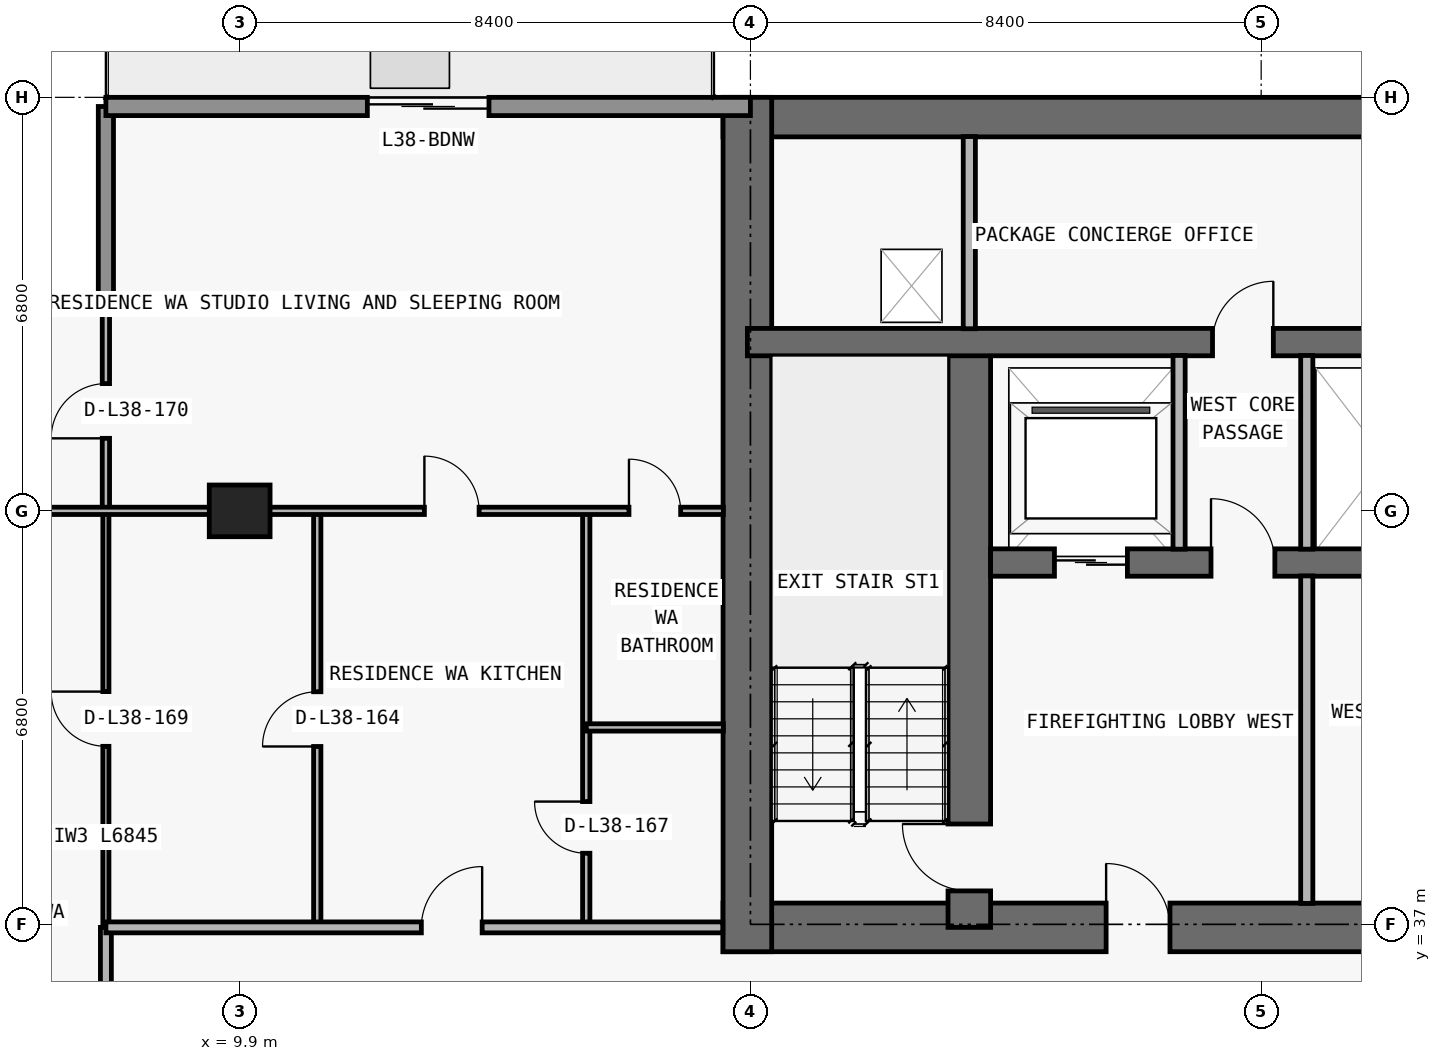
"""IFC4 building model, lengths in metres.
Left out: names, types, materials, properties, quantities, classifications, styles, units other than length and angle.
Written with IfcOpenShell. Run it as: python <this file> out.ifc"""

import sys

from ifc_helpers import new_model, si_unit, direction, frame, frame_2d, origin, origin_2d, place, context, subcontext, project, spatial, rectangle, extrude, element, fill, save


model = new_model("IFC4")
c1 = context("Model", 3, precision=1e-05, world=origin(), true_north=direction((0.0, 1.0)))
c2 = subcontext(c1, "Body", "Model", "MODEL_VIEW")
j1 = project(units=[si_unit("LENGTHUNIT", "METRE"), si_unit("PLANEANGLEUNIT", "RADIAN")], contexts=[c1])
p1 = place(None, origin())
s1 = spatial("IfcSite", under=j1, at=p1, CompositionType="ELEMENT")
p2 = place(p1, origin())
s2 = spatial("IfcBuilding", under=s1, at=p2, CompositionType="ELEMENT")
p3 = place(p2, frame((0.0, 0.0, 138.9)))
s3 = spatial("IfcBuildingStorey", under=s2, at=p3, CompositionType="ELEMENT", Elevation=138.9)
p4 = place(p3, frame((9.9, 43.8, 0.0), z_axis=(0.0, 0.0, 1.0), x_axis=(1.0, 0.0, 0.0)))
e1 = element("IfcColumn", 1, at=p4, inside=s3, PredefinedType="COLUMN", context=c2, shape_type="SweptSolid", body=[
    extrude(rectangle(XDim=1.0, YDim=0.85, at=origin_2d()), origin(), (0.0, 0.0, 1.0), 3.05),
])
p5 = place(p3, frame((17.85, 36.95, 0.0), z_axis=(0.0, 0.0, 1.0), x_axis=(1.0, 0.0, 0.0)))
e2 = element("IfcWall", 2, at=p5, inside=s3, PredefinedType="SHEAR", context=c2, shape_type="SweptSolid", body=[
    extrude(rectangle(XDim=42.1, YDim=0.8, at=frame_2d((21.05, 0.0))), origin(), (0.0, 0.0, 1.0), 3.05),
])
p6 = place(p5, frame((14.45, 0.0, 0.0)))
e3 = element("IfcOpeningElement", 3, at=p6, cuts=e2, PredefinedType="OPENING", context=c2, shape_type="SweptSolid", body=[
    extrude(rectangle(XDim=1.1, YDim=2.15, at=frame_2d((0.55, 1.075))), frame((0.0, 0.41, 0.0), z_axis=(0.0, -1.0, 0.0), x_axis=(1.0, 0.0, 0.0)), (0.0, 0.0, 1.0), 0.82),
])
p7 = place(p5, frame((6.3, 0.0, 0.0)))
e4 = element("IfcOpeningElement", 4, at=p7, cuts=e2, PredefinedType="OPENING", context=c2, shape_type="SweptSolid", body=[
    extrude(rectangle(XDim=1.05, YDim=2.15, at=frame_2d((0.525, 1.075))), frame((0.0, 0.41, 0.0), z_axis=(0.0, -1.0, 0.0), x_axis=(1.0, 0.0, 0.0)), (0.0, 0.0, 1.0), 0.82),
])
p8 = place(p5, frame((34.8, 0.0, 0.0)))
e5 = element("IfcOpeningElement", 5, at=p8, cuts=e2, PredefinedType="OPENING", context=c2, shape_type="SweptSolid", body=[
    extrude(rectangle(XDim=1.05, YDim=2.15, at=frame_2d((0.525, 1.075))), frame((0.0, 0.41, 0.0), z_axis=(0.0, -1.0, 0.0), x_axis=(1.0, 0.0, 0.0)), (0.0, 0.0, 1.0), 0.82),
])
p9 = place(p5, frame((10.913, 0.0, 0.0)))
e6 = element("IfcOpeningElement", 6, at=p9, cuts=e2, PredefinedType="OPENING", context=c2, shape_type="SweptSolid", body=[
    extrude(rectangle(XDim=1.05, YDim=2.15, at=frame_2d((0.525, 1.075))), frame((0.0, 0.41, 0.0), z_axis=(0.0, -1.0, 0.0), x_axis=(1.0, 0.0, 0.0)), (0.0, 0.0, 1.0), 0.82),
])
p10 = place(p5, frame((24.15, 0.0, 0.0)))
e7 = element("IfcOpeningElement", 7, at=p10, cuts=e2, PredefinedType="OPENING", context=c2, shape_type="SweptSolid", body=[
    extrude(rectangle(XDim=1.05, YDim=2.15, at=frame_2d((0.525, 1.075))), frame((0.0, 0.41, 0.0), z_axis=(0.0, -1.0, 0.0), x_axis=(1.0, 0.0, 0.0)), (0.0, 0.0, 1.0), 0.82),
])
p11 = place(p3, frame((17.85, 50.275, 0.0), z_axis=(0.0, 0.0, 1.0), x_axis=(1.0, 0.0, 0.0)))
e8 = element("IfcWall", 8, at=p11, inside=s3, PredefinedType="SHEAR", context=c2, shape_type="SweptSolid", body=[
    extrude(rectangle(XDim=42.1, YDim=0.65, at=frame_2d((21.05, 0.0))), origin(), (0.0, 0.0, 1.0), 3.05),
])
p12 = place(p3, frame((18.25, 36.55, 0.0), z_axis=(0.0, 0.0, 1.0), x_axis=(0.0, 1.0, 0.0)))
e9 = element("IfcWall", 9, at=p12, inside=s3, PredefinedType="SHEAR", context=c2, shape_type="SweptSolid", body=[
    extrude(rectangle(XDim=14.05, YDim=0.8, at=frame_2d((7.025, 0.0))), origin(), (0.0, 0.0, 1.0), 3.05),
])
p13 = place(p3, frame((21.9, 36.95, 0.0), z_axis=(0.0, 0.0, 1.0), x_axis=(0.0, 1.0, 0.0)))
e10 = element("IfcWall", 10, at=p13, inside=s3, PredefinedType="SHEAR", context=c2, shape_type="SweptSolid", body=[
    extrude(rectangle(XDim=9.625, YDim=0.7, at=frame_2d((4.812, 0.0))), origin(), (0.0, 0.0, 1.0), 3.05),
])
p14 = place(p13, frame((0.6, 0.0, 0.0)))
e11 = element("IfcOpeningElement", 11, at=p14, cuts=e10, PredefinedType="OPENING", context=c2, shape_type="SweptSolid", body=[
    extrude(rectangle(XDim=1.1, YDim=2.15, at=frame_2d((0.55, 1.075))), frame((0.0, 0.36, 0.0), z_axis=(0.0, -1.0, 0.0), x_axis=(1.0, 0.0, 0.0)), (0.0, 0.0, 1.0), 0.72),
])
p15 = place(p3, frame((22.25, 42.95, 0.0), z_axis=(0.0, 0.0, 1.0), x_axis=(1.0, 0.0, 0.0)))
e12 = element("IfcWall", 12, at=p15, inside=s3, PredefinedType="SHEAR", context=c2, shape_type="SweptSolid", body=[
    extrude(rectangle(XDim=33.3, YDim=0.45, at=frame_2d((16.65, 0.0))), origin(), (0.0, 0.0, 1.0), 3.05),
])
p16 = place(p15, frame((1.05, 0.0, 0.0)))
e13 = element("IfcOpeningElement", 13, at=p16, cuts=e12, PredefinedType="OPENING", context=c2, shape_type="SweptSolid", body=[
    extrude(rectangle(XDim=1.2, YDim=2.2, at=frame_2d((0.6, 1.1))), frame((0.0, 0.235, 0.0), z_axis=(0.0, -1.0, 0.0), x_axis=(1.0, 0.0, 0.0)), (0.0, 0.0, 1.0), 0.47),
])
p17 = place(p15, frame((31.05, 0.0, 0.0)))
e14 = element("IfcOpeningElement", 14, at=p17, cuts=e12, PredefinedType="OPENING", context=c2, shape_type="SweptSolid", body=[
    extrude(rectangle(XDim=1.2, YDim=2.2, at=frame_2d((0.6, 1.1))), frame((0.0, 0.235, 0.0), z_axis=(0.0, -1.0, 0.0), x_axis=(1.0, 0.0, 0.0)), (0.0, 0.0, 1.0), 0.47),
])
p18 = place(p15, frame((21.4, 0.0, 0.0)))
e15 = element("IfcOpeningElement", 15, at=p18, cuts=e12, PredefinedType="OPENING", context=c2, shape_type="SweptSolid", body=[
    extrude(rectangle(XDim=1.1, YDim=2.2, at=frame_2d((0.55, 1.1))), frame((0.0, 0.235, 0.0), z_axis=(0.0, -1.0, 0.0), x_axis=(1.0, 0.0, 0.0)), (0.0, 0.0, 1.0), 0.47),
])
p19 = place(p15, frame((24.0, 0.0, 0.0)))
e16 = element("IfcOpeningElement", 16, at=p19, cuts=e12, PredefinedType="OPENING", context=c2, shape_type="SweptSolid", body=[
    extrude(rectangle(XDim=1.1, YDim=2.2, at=frame_2d((0.55, 1.1))), frame((0.0, 0.235, 0.0), z_axis=(0.0, -1.0, 0.0), x_axis=(1.0, 0.0, 0.0)), (0.0, 0.0, 1.0), 0.47),
])
p20 = place(p15, frame((3.625, 0.0, 0.0)))
e17 = element("IfcOpeningElement", 17, at=p20, cuts=e12, PredefinedType="OPENING", context=c2, shape_type="SweptSolid", body=[
    extrude(rectangle(XDim=1.05, YDim=2.15, at=frame_2d((0.525, 1.075))), frame((0.0, 0.235, 0.0), z_axis=(0.0, -1.0, 0.0), x_axis=(1.0, 0.0, 0.0)), (0.0, 0.0, 1.0), 0.47),
])
p21 = place(p15, frame((28.675, 0.0, 0.0)))
e18 = element("IfcOpeningElement", 18, at=p21, cuts=e12, PredefinedType="OPENING", context=c2, shape_type="SweptSolid", body=[
    extrude(rectangle(XDim=1.05, YDim=2.15, at=frame_2d((0.525, 1.075))), frame((0.0, 0.235, 0.0), z_axis=(0.0, -1.0, 0.0), x_axis=(1.0, 0.0, 0.0)), (0.0, 0.0, 1.0), 0.47),
])
p22 = place(p15, frame((15.975, 0.0, 0.0)))
e19 = element("IfcOpeningElement", 19, at=p22, cuts=e12, PredefinedType="OPENING", context=c2, shape_type="SweptSolid", body=[
    extrude(rectangle(XDim=1.0, YDim=2.2, at=frame_2d((0.5, 1.1))), frame((0.0, 0.235, 0.0), z_axis=(0.0, -1.0, 0.0), x_axis=(1.0, 0.0, 0.0)), (0.0, 0.0, 1.0), 0.47),
])
p23 = place(p3, frame((18.25, 46.575, 0.0), z_axis=(0.0, 0.0, 1.0), x_axis=(1.0, 0.0, 0.0)))
e20 = element("IfcWall", 20, at=p23, inside=s3, PredefinedType="SHEAR", context=c2, shape_type="SweptSolid", body=[
    extrude(rectangle(XDim=41.3, YDim=0.45, at=frame_2d((20.65, 0.0))), origin(), (0.0, 0.0, 1.0), 3.05),
])
p24 = place(p23, frame((7.65, 0.0, 0.0)))
e21 = element("IfcOpeningElement", 21, at=p24, cuts=e20, PredefinedType="OPENING", context=c2, shape_type="SweptSolid", body=[
    extrude(rectangle(XDim=1.0, YDim=2.2, at=frame_2d((0.5, 1.1))), frame((0.0, 0.235, 0.0), z_axis=(0.0, -1.0, 0.0), x_axis=(1.0, 0.0, 0.0)), (0.0, 0.0, 1.0), 0.47),
])
p25 = place(p23, frame((32.675, 0.0, 0.0)))
e22 = element("IfcOpeningElement", 22, at=p25, cuts=e20, PredefinedType="OPENING", context=c2, shape_type="SweptSolid", body=[
    extrude(rectangle(XDim=1.05, YDim=2.15, at=frame_2d((0.525, 1.075))), frame((0.0, 0.235, 0.0), z_axis=(0.0, -1.0, 0.0), x_axis=(1.0, 0.0, 0.0)), (0.0, 0.0, 1.0), 0.47),
])
p26 = place(p3, frame((4.05, 47.2, 0.0), z_axis=(0.0, 0.0, 1.0), x_axis=(1.0, 0.0, 0.0)))
e23 = element("IfcWall", 23, at=p26, inside=s3, PredefinedType="ELEMENTEDWALL", context=c2, shape_type="SweptSolid", body=[
    extrude(rectangle(XDim=3.65, YDim=0.25, at=frame_2d((1.825, 0.0))), origin(), (0.0, 0.0, 1.0), 3.05),
])
p27 = place(p3, frame((7.7, 47.2, 0.0), z_axis=(0.0, 0.0, 1.0), x_axis=(0.0, 1.0, 0.0)))
e24 = element("IfcWall", 24, at=p27, inside=s3, PredefinedType="ELEMENTEDWALL", context=c2, shape_type="SweptSolid", body=[
    extrude(rectangle(XDim=3.25, YDim=0.25, at=frame_2d((1.625, 0.0))), origin(), (0.0, 0.0, 1.0), 3.05),
])
p28 = place(p3, frame((7.7, 50.45, 0.0), z_axis=(0.0, 0.0, 1.0), x_axis=(1.0, 0.0, 0.0)))
e25 = element("IfcWall", 25, at=p28, inside=s3, PredefinedType="STANDARD", context=c2, shape_type="SweptSolid", body=[
    extrude(rectangle(XDim=10.6, YDim=0.3, at=frame_2d((5.3, 0.0))), origin(), (0.0, 0.0, 1.0), 3.05),
])
p29 = place(p28, frame((4.3, 0.0, 0.0)))
e26 = element("IfcOpeningElement", 26, at=p29, cuts=e25, PredefinedType="OPENING", context=c2, shape_type="SweptSolid", body=[
    extrude(rectangle(XDim=2.0, YDim=2.3, at=frame_2d((1.0, 1.15))), frame((0.0, 0.16, 0.0), z_axis=(0.0, -1.0, 0.0), x_axis=(1.0, 0.0, 0.0)), (0.0, 0.0, 1.0), 0.32),
])
p30 = place(p3, frame((7.7, 34.005, 0.0), z_axis=(0.0, 0.0, 1.0), x_axis=(0.0, 1.0, 0.0)))
e27 = element("IfcWall", 27, at=p30, inside=s3, PredefinedType="PARTITIONING", context=c2, shape_type="SweptSolid", body=[
    extrude(rectangle(XDim=2.945, YDim=0.18, at=frame_2d((1.473, 0.0))), origin(), (0.0, 0.0, 1.0), 3.05),
])
p31 = place(p3, frame((7.7, 36.955, 0.0), z_axis=(0.0, 0.0, 1.0), x_axis=(0.0, 1.0, 0.0)))
e28 = element("IfcWall", 28, at=p31, inside=s3, PredefinedType="MOVABLE", context=c2, shape_type="SweptSolid", body=[
    extrude(rectangle(XDim=6.845, YDim=0.1, at=frame_2d((3.422, 0.0))), origin(), (0.0, 0.0, 1.0), 3.05),
])
p32 = place(p31, frame((2.972, 0.0, 0.0)))
e29 = element("IfcOpeningElement", 29, at=p32, cuts=e28, PredefinedType="OPENING", context=c2, shape_type="SweptSolid", body=[
    extrude(rectangle(XDim=0.9, YDim=2.15, at=frame_2d((0.45, 1.075))), frame((0.0, 0.06, 0.0), z_axis=(0.0, -1.0, 0.0), x_axis=(1.0, 0.0, 0.0)), (0.0, 0.0, 1.0), 0.12),
])
p33 = place(p3, frame((7.7, 43.805, 0.0), z_axis=(0.0, 0.0, 1.0), x_axis=(0.0, 1.0, 0.0)))
e30 = element("IfcWall", 30, at=p33, inside=s3, PredefinedType="PARTITIONING", context=c2, shape_type="SweptSolid", body=[
    extrude(rectangle(XDim=3.275, YDim=0.12, at=frame_2d((1.638, 0.0))), origin(), (0.0, 0.0, 1.0), 3.05),
])
p34 = place(p33, frame((1.188, 0.0, 0.0)))
e31 = element("IfcOpeningElement", 31, at=p34, cuts=e30, PredefinedType="OPENING", context=c2, shape_type="SweptSolid", body=[
    extrude(rectangle(XDim=0.9, YDim=2.15, at=frame_2d((0.45, 1.075))), frame((0.0, 0.07, 0.0), z_axis=(0.0, -1.0, 0.0), x_axis=(1.0, 0.0, 0.0)), (0.0, 0.0, 1.0), 0.14),
])
p35 = place(p3, frame((11.176, 36.95, 0.0), z_axis=(0.0, 0.0, 1.0), x_axis=(0.0, 1.0, 0.0)))
e32 = element("IfcWall", 32, at=p35, inside=s3, PredefinedType="PARTITIONING", context=c2, shape_type="SweptSolid", body=[
    extrude(rectangle(XDim=6.85, YDim=0.12, at=frame_2d((3.425, 0.0))), origin(), (0.0, 0.0, 1.0), 3.05),
])
p36 = place(p35, frame((2.975, 0.0, 0.0)))
e33 = element("IfcOpeningElement", 33, at=p36, cuts=e32, PredefinedType="OPENING", context=c2, shape_type="SweptSolid", body=[
    extrude(rectangle(XDim=0.9, YDim=2.15, at=frame_2d((0.45, 1.075))), frame((0.0, 0.07, 0.0), z_axis=(0.0, -1.0, 0.0), x_axis=(1.0, 0.0, 0.0)), (0.0, 0.0, 1.0), 0.14),
])
p37 = place(p3, frame((15.6, 36.95, 0.0), z_axis=(0.0, 0.0, 1.0), x_axis=(0.0, 1.0, 0.0)))
e34 = element("IfcWall", 34, at=p37, inside=s3, PredefinedType="PARTITIONING", context=c2, shape_type="SweptSolid", body=[
    extrude(rectangle(XDim=6.85, YDim=0.12, at=frame_2d((3.425, 0.0))), origin(), (0.0, 0.0, 1.0), 3.05),
])
p38 = place(p37, frame((1.219, 0.0, 0.0)))
e35 = element("IfcOpeningElement", 35, at=p38, cuts=e34, PredefinedType="OPENING", context=c2, shape_type="SweptSolid", body=[
    extrude(rectangle(XDim=0.85, YDim=2.1, at=frame_2d((0.425, 1.05))), frame((0.0, 0.07, 0.0), z_axis=(0.0, -1.0, 0.0), x_axis=(1.0, 0.0, 0.0)), (0.0, 0.0, 1.0), 0.14),
])
p39 = place(p3, frame((21.9, 46.795, 0.0), z_axis=(0.0, 0.0, 1.0), x_axis=(0.0, 1.0, 0.0)))
e36 = element("IfcWall", 36, at=p39, inside=s3, PredefinedType="PARTITIONING", context=c2, shape_type="SweptSolid", body=[
    extrude(rectangle(XDim=3.16, YDim=0.2, at=frame_2d((1.58, 0.0))), origin(), (0.0, 0.0, 1.0), 3.05),
])
p40 = place(p3, frame((25.35, 43.17, 0.0), z_axis=(0.0, 0.0, 1.0), x_axis=(0.0, 1.0, 0.0)))
e37 = element("IfcWall", 37, at=p40, inside=s3, PredefinedType="PARTITIONING", context=c2, shape_type="SweptSolid", body=[
    extrude(rectangle(XDim=3.185, YDim=0.2, at=frame_2d((1.593, 0.0))), origin(), (0.0, 0.0, 1.0), 3.05),
])
p41 = place(p3, frame((27.45, 37.345, 0.0), z_axis=(0.0, 0.0, 1.0), x_axis=(0.0, 1.0, 0.0)))
e38 = element("IfcWall", 38, at=p41, inside=s3, PredefinedType="PARTITIONING", context=c2, shape_type="SweptSolid", body=[
    extrude(rectangle(XDim=5.385, YDim=0.2, at=frame_2d((2.692, 0.0))), origin(), (0.0, 0.0, 1.0), 3.05),
])
p42 = place(p3, frame((27.45, 43.17, 0.0), z_axis=(0.0, 0.0, 1.0), x_axis=(0.0, 1.0, 0.0)))
e39 = element("IfcWall", 39, at=p42, inside=s3, PredefinedType="PARTITIONING", context=c2, shape_type="SweptSolid", body=[
    extrude(rectangle(XDim=3.185, YDim=0.2, at=frame_2d((1.593, 0.0))), origin(), (0.0, 0.0, 1.0), 3.05),
])
p43 = place(p3, frame((7.7, 36.95, 0.0), z_axis=(0.0, 0.0, 1.0), x_axis=(1.0, 0.0, 0.0)))
e40 = element("IfcWall", 40, at=p43, inside=s3, PredefinedType="PARTITIONING", context=c2, shape_type="SweptSolid", body=[
    extrude(rectangle(XDim=10.145, YDim=0.18, at=frame_2d((5.073, 0.0))), origin(), (0.0, 0.0, 1.0), 3.05),
])
p44 = place(p43, frame((5.188, 0.0, 0.0)))
e41 = element("IfcOpeningElement", 41, at=p44, cuts=e40, PredefinedType="OPENING", context=c2, shape_type="SweptSolid", body=[
    extrude(rectangle(XDim=1.0, YDim=2.2, at=frame_2d((0.5, 1.1))), frame((0.0, 0.1, 0.0), z_axis=(0.0, -1.0, 0.0), x_axis=(1.0, 0.0, 0.0)), (0.0, 0.0, 1.0), 0.2),
])
p45 = place(p3, frame((15.6, 40.238, 0.0), z_axis=(0.0, 0.0, 1.0), x_axis=(1.0, 0.0, 0.0)))
e42 = element("IfcWall", 42, at=p45, inside=s3, PredefinedType="PARTITIONING", context=c2, shape_type="SweptSolid", body=[
    extrude(rectangle(XDim=2.255, YDim=0.12, at=frame_2d((1.127, 0.0))), origin(), (0.0, 0.0, 1.0), 3.05),
])
p46 = place(p3, frame((4.195, 43.8, 0.0), z_axis=(0.0, 0.0, 1.0), x_axis=(1.0, 0.0, 0.0)))
e43 = element("IfcWall", 43, at=p46, inside=s3, PredefinedType="PARTITIONING", context=c2, shape_type="SweptSolid", body=[
    extrude(rectangle(XDim=13.66, YDim=0.12, at=frame_2d((6.83, 0.0))), origin(), (0.0, 0.0, 1.0), 2.339),
])
p47 = place(p46, frame((8.743, 0.0, 0.0)))
e44 = element("IfcOpeningElement", 44, at=p47, cuts=e43, PredefinedType="OPENING", context=c2, shape_type="SweptSolid", body=[
    extrude(rectangle(XDim=0.9, YDim=2.15, at=frame_2d((0.45, 1.075))), frame((0.0, 0.07, 0.0), z_axis=(0.0, -1.0, 0.0), x_axis=(1.0, 0.0, 0.0)), (0.0, 0.0, 1.0), 0.14),
])
p48 = place(p46, frame((12.107, 0.0, 0.0)))
e45 = element("IfcOpeningElement", 45, at=p48, cuts=e43, PredefinedType="OPENING", context=c2, shape_type="SweptSolid", body=[
    extrude(rectangle(XDim=0.85, YDim=2.1, at=frame_2d((0.425, 1.05))), frame((0.0, 0.07, 0.0), z_axis=(0.0, -1.0, 0.0), x_axis=(1.0, 0.0, 0.0)), (0.0, 0.0, 1.0), 0.14),
])
p49 = place(p29, origin())
e46 = element("IfcDoor", 46, at=p49, inside=s3, OperationType="DOUBLE_DOOR_SLIDING", PredefinedType="DOOR", context=c2, shape_type="SweptSolid", body=[
    extrude(rectangle(XDim=2.0, YDim=2.3, at=frame_2d((1.0, 1.15))), frame((0.0, 0.025, 0.0), z_axis=(0.0, -1.0, 0.0), x_axis=(1.0, 0.0, 0.0)), (0.0, 0.0, 1.0), 0.05),
])
fill(e26, e46)
p50 = place(p16, origin())
e47 = element("IfcDoor", 47, at=p50, inside=s3, OperationType="DOUBLE_DOOR_SLIDING", PredefinedType="DOOR", context=c2, shape_type="SweptSolid", body=[
    extrude(rectangle(XDim=1.2, YDim=2.2, at=frame_2d((0.6, 1.1))), frame((0.0, 0.025, 0.0), z_axis=(0.0, -1.0, 0.0), x_axis=(1.0, 0.0, 0.0)), (0.0, 0.0, 1.0), 0.05),
])
fill(e13, e47)
p51 = place(p7, origin())
e48 = element("IfcDoor", 48, at=p51, inside=s3, OperationType="SINGLE_SWING_LEFT", PredefinedType="DOOR", context=c2, shape_type="SweptSolid", body=[
    extrude(rectangle(XDim=1.05, YDim=2.15, at=frame_2d((0.525, 1.075))), frame((0.0, 0.025, 0.0), z_axis=(0.0, -1.0, 0.0), x_axis=(1.0, 0.0, 0.0)), (0.0, 0.0, 1.0), 0.05),
])
fill(e4, e48)
p52 = place(p14, origin())
e49 = element("IfcDoor", 49, at=p52, inside=s3, OperationType="SINGLE_SWING_RIGHT", PredefinedType="DOOR", context=c2, shape_type="SweptSolid", body=[
    extrude(rectangle(XDim=1.1, YDim=2.15, at=frame_2d((0.55, 1.075))), frame((0.0, 0.025, 0.0), z_axis=(0.0, -1.0, 0.0), x_axis=(1.0, 0.0, 0.0)), (0.0, 0.0, 1.0), 0.05),
])
fill(e11, e49)
p53 = place(p20, origin())
e50 = element("IfcDoor", 50, at=p53, inside=s3, OperationType="SINGLE_SWING_LEFT", PredefinedType="DOOR", context=c2, shape_type="SweptSolid", body=[
    extrude(rectangle(XDim=1.05, YDim=2.15, at=frame_2d((0.525, 1.075))), frame((0.0, 0.025, 0.0), z_axis=(0.0, -1.0, 0.0), x_axis=(1.0, 0.0, 0.0)), (0.0, 0.0, 1.0), 0.05),
])
fill(e17, e50)
p54 = place(p24, origin())
e51 = element("IfcDoor", 51, at=p54, inside=s3, OperationType="SINGLE_SWING_RIGHT", PredefinedType="DOOR", context=c2, shape_type="SweptSolid", body=[
    extrude(rectangle(XDim=1.0, YDim=2.2, at=frame_2d((0.5, 1.1))), frame((0.0, 0.025, 0.0), z_axis=(0.0, -1.0, 0.0), x_axis=(1.0, 0.0, 0.0)), (0.0, 0.0, 1.0), 0.05),
])
fill(e21, e51)
p55 = place(p36, origin())
e52 = element("IfcDoor", 52, at=p55, inside=s3, OperationType="SINGLE_SWING_LEFT", PredefinedType="DOOR", context=c2, shape_type="SweptSolid", body=[
    extrude(rectangle(XDim=0.9, YDim=2.15, at=frame_2d((0.45, 1.075))), frame((0.0, 0.025, 0.0), z_axis=(0.0, -1.0, 0.0), x_axis=(1.0, 0.0, 0.0)), (0.0, 0.0, 1.0), 0.05),
])
fill(e33, e52)
p56 = place(p44, origin())
e53 = element("IfcDoor", 53, at=p56, inside=s3, OperationType="SINGLE_SWING_RIGHT", PredefinedType="DOOR", context=c2, shape_type="SweptSolid", body=[
    extrude(rectangle(XDim=1.0, YDim=2.2, at=frame_2d((0.5, 1.1))), frame((0.0, 0.025, 0.0), z_axis=(0.0, -1.0, 0.0), x_axis=(1.0, 0.0, 0.0)), (0.0, 0.0, 1.0), 0.05),
])
fill(e41, e53)
p57 = place(p47, origin())
e54 = element("IfcDoor", 54, at=p57, inside=s3, OperationType="SINGLE_SWING_LEFT", PredefinedType="DOOR", context=c2, shape_type="SweptSolid", body=[
    extrude(rectangle(XDim=0.9, YDim=2.15, at=frame_2d((0.45, 1.075))), frame((0.0, 0.025, 0.0), z_axis=(0.0, -1.0, 0.0), x_axis=(1.0, 0.0, 0.0)), (0.0, 0.0, 1.0), 0.05),
])
fill(e44, e54)
p58 = place(p38, origin())
e55 = element("IfcDoor", 55, at=p58, inside=s3, OperationType="SINGLE_SWING_RIGHT", PredefinedType="DOOR", context=c2, shape_type="SweptSolid", body=[
    extrude(rectangle(XDim=0.85, YDim=2.1, at=frame_2d((0.425, 1.05))), frame((0.0, 0.025, 0.0), z_axis=(0.0, -1.0, 0.0), x_axis=(1.0, 0.0, 0.0)), (0.0, 0.0, 1.0), 0.05),
])
fill(e35, e55)
p59 = place(p48, origin())
e56 = element("IfcDoor", 56, at=p59, inside=s3, OperationType="SINGLE_SWING_LEFT", PredefinedType="DOOR", context=c2, shape_type="SweptSolid", body=[
    extrude(rectangle(XDim=0.85, YDim=2.1, at=frame_2d((0.425, 1.05))), frame((0.0, 0.025, 0.0), z_axis=(0.0, -1.0, 0.0), x_axis=(1.0, 0.0, 0.0)), (0.0, 0.0, 1.0), 0.05),
])
fill(e45, e56)
p60 = place(p32, origin())
e57 = element("IfcDoor", 57, at=p60, inside=s3, OperationType="SINGLE_SWING_RIGHT", PredefinedType="DOOR", context=c2, shape_type="SweptSolid", body=[
    extrude(rectangle(XDim=0.9, YDim=2.15, at=frame_2d((0.45, 1.075))), frame((0.0, 0.025, 0.0), z_axis=(0.0, -1.0, 0.0), x_axis=(1.0, 0.0, 0.0)), (0.0, 0.0, 1.0), 0.05),
])
fill(e29, e57)
p61 = place(p34, origin())
e58 = element("IfcDoor", 58, at=p61, inside=s3, OperationType="SINGLE_SWING_LEFT", PredefinedType="DOOR", context=c2, shape_type="SweptSolid", body=[
    extrude(rectangle(XDim=0.9, YDim=2.15, at=frame_2d((0.45, 1.075))), frame((0.0, 0.025, 0.0), z_axis=(0.0, -1.0, 0.0), x_axis=(1.0, 0.0, 0.0)), (0.0, 0.0, 1.0), 0.05),
])
fill(e31, e58)
save(model, sys.argv[1])
